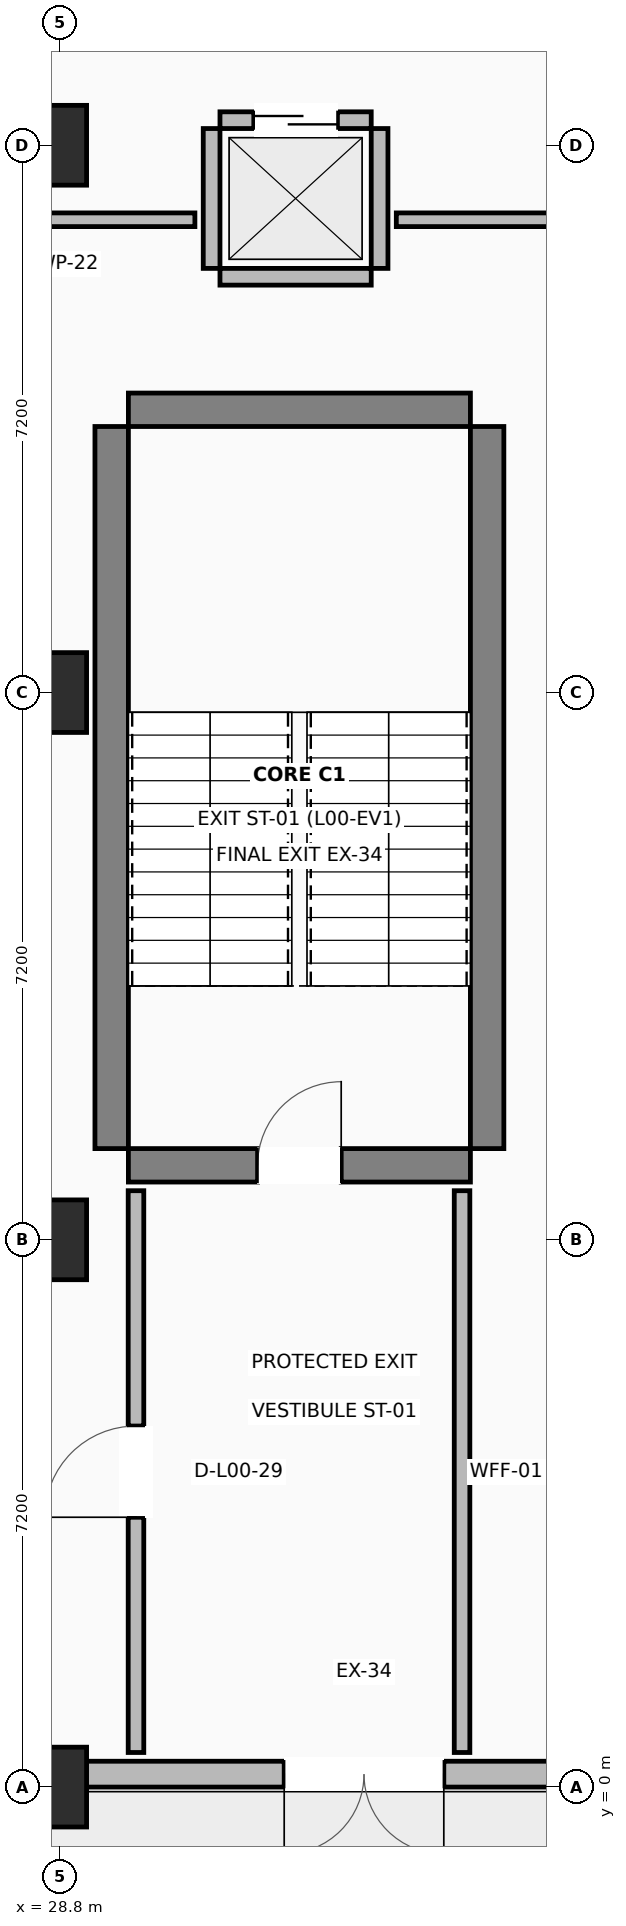
"""IFC4 building model, lengths in metres.
Left out: names, types, materials, properties, quantities, classifications, styles, units other than length and angle.
Written with IfcOpenShell. Run it as: python <this file> out.ifc"""

import sys

from ifc_helpers import new_model, si_unit, direction, frame, frame_2d, origin, origin_2d, place, context, subcontext, project, spatial, rectangle, extrude, element, fill, save


model = new_model("IFC4")
c1 = context("Model", 3, precision=1e-05, world=origin(), true_north=direction((0.0, 1.0)))
c2 = subcontext(c1, "Body", "Model", "MODEL_VIEW")
j1 = project(units=[si_unit("LENGTHUNIT", "METRE"), si_unit("PLANEANGLEUNIT", "RADIAN")], contexts=[c1])
p1 = place(None, origin())
s1 = spatial("IfcSite", under=j1, at=p1, CompositionType="ELEMENT")
p2 = place(p1, origin())
s2 = spatial("IfcBuilding", under=s1, at=p2, CompositionType="ELEMENT")
p3 = place(p2, origin())
s3 = spatial("IfcBuildingStorey", under=s2, at=p3, CompositionType="ELEMENT", Elevation=0.0)
for number, where, z_axis, x_axis in (
    (1, (28.8, 0.0, 0.0), (0.0, 0.0, 1.0), (1.0, 0.0, 0.0)),
    (2, (28.8, 7.2, 0.0), (0.0, 0.0, 1.0), (1.0, 0.0, 0.0)),
    (3, (28.8, 14.4, 0.0), (0.0, 0.0, 1.0), (1.0, 0.0, 0.0)),
    (4, (28.8, 21.6, 0.0), (0.0, 0.0, 1.0), (1.0, 0.0, 0.0)),
):
    element("IfcColumn", number, at=place(p3, frame(where, z_axis=z_axis, x_axis=x_axis)), inside=s3, PredefinedType="COLUMN", context=c2, shape_type="SweptSolid", body=[
        extrude(rectangle(XDim=0.7, YDim=1.05, at=origin_2d()), origin(), (0.0, 0.0, 1.0), 4.22),
    ])
p4 = place(p3, frame((29.7, 8.18, 0.0), z_axis=(0.0, 0.0, 1.0), x_axis=(1.0, 0.0, 0.0)))
e5 = element("IfcWall", 5, at=p4, inside=s3, PredefinedType="SHEAR", context=c2, shape_type="SweptSolid", body=[
    extrude(rectangle(XDim=4.5, YDim=0.44, at=frame_2d((2.25, 0.0))), origin(), (0.0, 0.0, 1.0), 4.22),
])
p5 = place(p4, frame((1.7, 0.0, 0.0)))
e6 = element("IfcOpeningElement", 6, at=p5, cuts=e5, PredefinedType="OPENING", context=c2, shape_type="SweptSolid", body=[
    extrude(rectangle(XDim=1.1, YDim=2.15, at=frame_2d((0.55, 1.075))), frame((0.0, 0.23, 0.0), z_axis=(0.0, -1.0, 0.0), x_axis=(1.0, 0.0, 0.0)), (0.0, 0.0, 1.0), 0.46),
])
p6 = place(p3, frame((29.7, 18.12, 0.0), z_axis=(0.0, 0.0, 1.0), x_axis=(1.0, 0.0, 0.0)))
e7 = element("IfcWall", 7, at=p6, inside=s3, PredefinedType="SHEAR", context=c2, shape_type="SweptSolid", body=[
    extrude(rectangle(XDim=4.5, YDim=0.44, at=frame_2d((2.25, 0.0))), origin(), (0.0, 0.0, 1.0), 4.22),
])
for number, where, z_axis, x_axis in (
    (8, (29.48, 8.4, 0.0), (0.0, 0.0, 1.0), (0.0, 1.0, 0.0)),
    (9, (34.42, 8.4, 0.0), (0.0, 0.0, 1.0), (0.0, 1.0, 0.0)),
):
    element("IfcWall", number, at=place(p3, frame(where, z_axis=z_axis, x_axis=x_axis)), inside=s3, PredefinedType="SHEAR", context=c2, shape_type="SweptSolid", body=[
        extrude(rectangle(XDim=9.5, YDim=0.44, at=frame_2d((4.75, 0.0))), origin(), (0.0, 0.0, 1.0), 4.22),
    ])
p7 = place(p3, frame((28.8, 0.183, 0.0), z_axis=(0.0, 0.0, 1.0), x_axis=(-1.0, 0.0, 0.0)))
e10 = element("IfcWall", 10, at=p7, inside=s3, PredefinedType="STANDARD", context=c2, shape_type="SweptSolid", body=[
    extrude(rectangle(XDim=7.2, YDim=0.365, at=frame_2d((3.6, 0.0))), origin(), (0.0, 0.0, 1.0), 2.6),
])
p8 = place(p7, frame((1.2, 0.0, 0.0)))
e11 = element("IfcOpeningElement", 11, at=p8, cuts=e10, PredefinedType="OPENING", context=c2, shape_type="SweptSolid", body=[
    extrude(rectangle(XDim=2.1, YDim=2.3, at=frame_2d((1.05, 1.15))), frame((0.0, 0.192, 0.0), z_axis=(0.0, -1.0, 0.0), x_axis=(1.0, 0.0, 0.0)), (0.0, 0.0, 1.0), 0.385),
])
p9 = place(p3, frame((36.0, 0.17, 0.0), z_axis=(0.0, 0.0, 1.0), x_axis=(-1.0, 0.0, 0.0)))
e12 = element("IfcWall", 12, at=p9, inside=s3, PredefinedType="STANDARD", context=c2, shape_type="SweptSolid", body=[
    extrude(rectangle(XDim=7.2, YDim=0.34, at=frame_2d((3.6, 0.0))), origin(), (0.0, 0.0, 1.0), 2.6),
])
p10 = place(p9, frame((2.15, 0.0, 0.0)))
e13 = element("IfcOpeningElement", 13, at=p10, cuts=e12, PredefinedType="OPENING", context=c2, shape_type="SweptSolid", body=[
    extrude(rectangle(XDim=2.1, YDim=2.3, at=frame_2d((1.05, 1.15))), frame((0.0, 0.18, 0.0), z_axis=(0.0, -1.0, 0.0), x_axis=(1.0, 0.0, 0.0)), (0.0, 0.0, 1.0), 0.36),
])
p11 = place(p3, frame((30.905, 19.87, 0.0), z_axis=(0.0, 0.0, 1.0), x_axis=(1.0, 0.0, 0.0)))
e14 = element("IfcWall", 14, at=p11, inside=s3, PredefinedType="STANDARD", context=c2, shape_type="SweptSolid", body=[
    extrude(rectangle(XDim=1.99, YDim=0.22, at=frame_2d((0.995, 0.0))), origin(), (0.0, 0.0, 1.0), 2.6),
])
p12 = place(p3, frame((30.905, 21.93, 0.0), z_axis=(0.0, 0.0, 1.0), x_axis=(1.0, 0.0, 0.0)))
e15 = element("IfcWall", 15, at=p12, inside=s3, PredefinedType="STANDARD", context=c2, shape_type="SweptSolid", body=[
    extrude(rectangle(XDim=1.99, YDim=0.22, at=frame_2d((0.995, 0.0))), origin(), (0.0, 0.0, 1.0), 2.6),
])
p13 = place(p12, frame((0.445, 0.0, 0.0)))
e16 = element("IfcOpeningElement", 16, at=p13, cuts=e15, PredefinedType="OPENING", context=c2, shape_type="SweptSolid", body=[
    extrude(rectangle(XDim=1.1, YDim=2.15, at=frame_2d((0.55, 1.075))), frame((0.0, 0.12, 0.0), z_axis=(0.0, -1.0, 0.0), x_axis=(1.0, 0.0, 0.0)), (0.0, 0.0, 1.0), 0.24),
])
for number, where, z_axis, x_axis in (
    (17, (30.795, 19.98, 0.0), (0.0, 0.0, 1.0), (0.0, 1.0, 0.0)),
    (18, (33.005, 19.98, 0.0), (0.0, 0.0, 1.0), (0.0, 1.0, 0.0)),
):
    element("IfcWall", number, at=place(p3, frame(where, z_axis=z_axis, x_axis=x_axis)), inside=s3, PredefinedType="STANDARD", context=c2, shape_type="SweptSolid", body=[
        extrude(rectangle(XDim=1.84, YDim=0.22, at=frame_2d((0.92, 0.0))), origin(), (0.0, 0.0, 1.0), 2.6),
    ])
p14 = place(p3, frame((30.575, 20.62, 0.0), z_axis=(0.0, 0.0, 1.0), x_axis=(-1.0, 0.0, 0.0)))
e19 = element("IfcWall", 19, at=p14, inside=s3, PredefinedType="PARTITIONING", context=c2, shape_type="SweptSolid", body=[
    extrude(rectangle(XDim=3.355, YDim=0.18, at=frame_2d((1.677, 0.0))), origin(), (0.0, 0.0, 1.0), 2.6),
])
p15 = place(p3, frame((35.808, 20.62, 0.0), z_axis=(0.0, 0.0, 1.0), x_axis=(-1.0, 0.0, 0.0)))
e20 = element("IfcWall", 20, at=p15, inside=s3, PredefinedType="PARTITIONING", context=c2, shape_type="SweptSolid", body=[
    extrude(rectangle(XDim=2.583, YDim=0.18, at=frame_2d((1.292, 0.0))), origin(), (0.0, 0.0, 1.0), 2.6),
])
p16 = place(p3, frame((34.09, 7.846, 0.0), z_axis=(0.0, 0.0, 1.0), x_axis=(0.0, -1.0, 0.0)))
e21 = element("IfcWall", 21, at=p16, inside=s3, PredefinedType="PARTITIONING", context=c2, shape_type="SweptSolid", body=[
    extrude(rectangle(XDim=7.391, YDim=0.205, at=frame_2d((3.695, 0.0))), origin(), (0.0, 0.0, 1.0), 2.6),
])
p17 = place(p3, frame((29.8, 0.455, 0.0), z_axis=(0.0, 0.0, 1.0), x_axis=(0.0, 1.0, 0.0)))
e22 = element("IfcWall", 22, at=p17, inside=s3, PredefinedType="PARTITIONING", context=c2, shape_type="SweptSolid", body=[
    extrude(rectangle(XDim=7.391, YDim=0.205, at=frame_2d((3.695, 0.0))), origin(), (0.0, 0.0, 1.0), 2.6),
])
p18 = place(p17, frame((3.095, 0.0, 0.0)))
e23 = element("IfcOpeningElement", 23, at=p18, cuts=e22, PredefinedType="OPENING", context=c2, shape_type="SweptSolid", body=[
    extrude(rectangle(XDim=1.2, YDim=2.15, at=frame_2d((0.6, 1.075))), frame((0.0, 0.113, 0.0), z_axis=(0.0, -1.0, 0.0), x_axis=(1.0, 0.0, 0.0)), (0.0, 0.0, 1.0), 0.225),
])
p19 = place(p10, origin())
e24 = element("IfcDoor", 24, at=p19, inside=s3, OperationType="DOUBLE_DOOR_SINGLE_SWING", PredefinedType="DOOR", context=c2, shape_type="SweptSolid", body=[
    extrude(rectangle(XDim=2.1, YDim=2.3, at=frame_2d((1.05, 1.15))), frame((0.0, 0.025, 0.0), z_axis=(0.0, -1.0, 0.0), x_axis=(1.0, 0.0, 0.0)), (0.0, 0.0, 1.0), 0.05),
])
fill(e13, e24)
p20 = place(p5, origin())
e25 = element("IfcDoor", 25, at=p20, inside=s3, OperationType="SINGLE_SWING_RIGHT", PredefinedType="DOOR", context=c2, shape_type="SweptSolid", body=[
    extrude(rectangle(XDim=1.1, YDim=2.15, at=frame_2d((0.55, 1.075))), frame((0.0, 0.025, 0.0), z_axis=(0.0, -1.0, 0.0), x_axis=(1.0, 0.0, 0.0)), (0.0, 0.0, 1.0), 0.05),
])
fill(e6, e25)
p21 = place(p13, origin())
e26 = element("IfcDoor", 26, at=p21, inside=s3, OperationType="SLIDING_TO_RIGHT", PredefinedType="DOOR", context=c2, shape_type="SweptSolid", body=[
    extrude(rectangle(XDim=1.1, YDim=2.15, at=frame_2d((0.55, 1.075))), frame((0.0, 0.025, 0.0), z_axis=(0.0, -1.0, 0.0), x_axis=(1.0, 0.0, 0.0)), (0.0, 0.0, 1.0), 0.05),
])
fill(e16, e26)
p22 = place(p18, origin())
e27 = element("IfcDoor", 27, at=p22, inside=s3, OperationType="SINGLE_SWING_LEFT", PredefinedType="DOOR", context=c2, shape_type="SweptSolid", body=[
    extrude(rectangle(XDim=1.2, YDim=2.15, at=frame_2d((0.6, 1.075))), frame((0.0, 0.025, 0.0), z_axis=(0.0, -1.0, 0.0), x_axis=(1.0, 0.0, 0.0)), (0.0, 0.0, 1.0), 0.05),
])
fill(e23, e27)
save(model, sys.argv[1])
